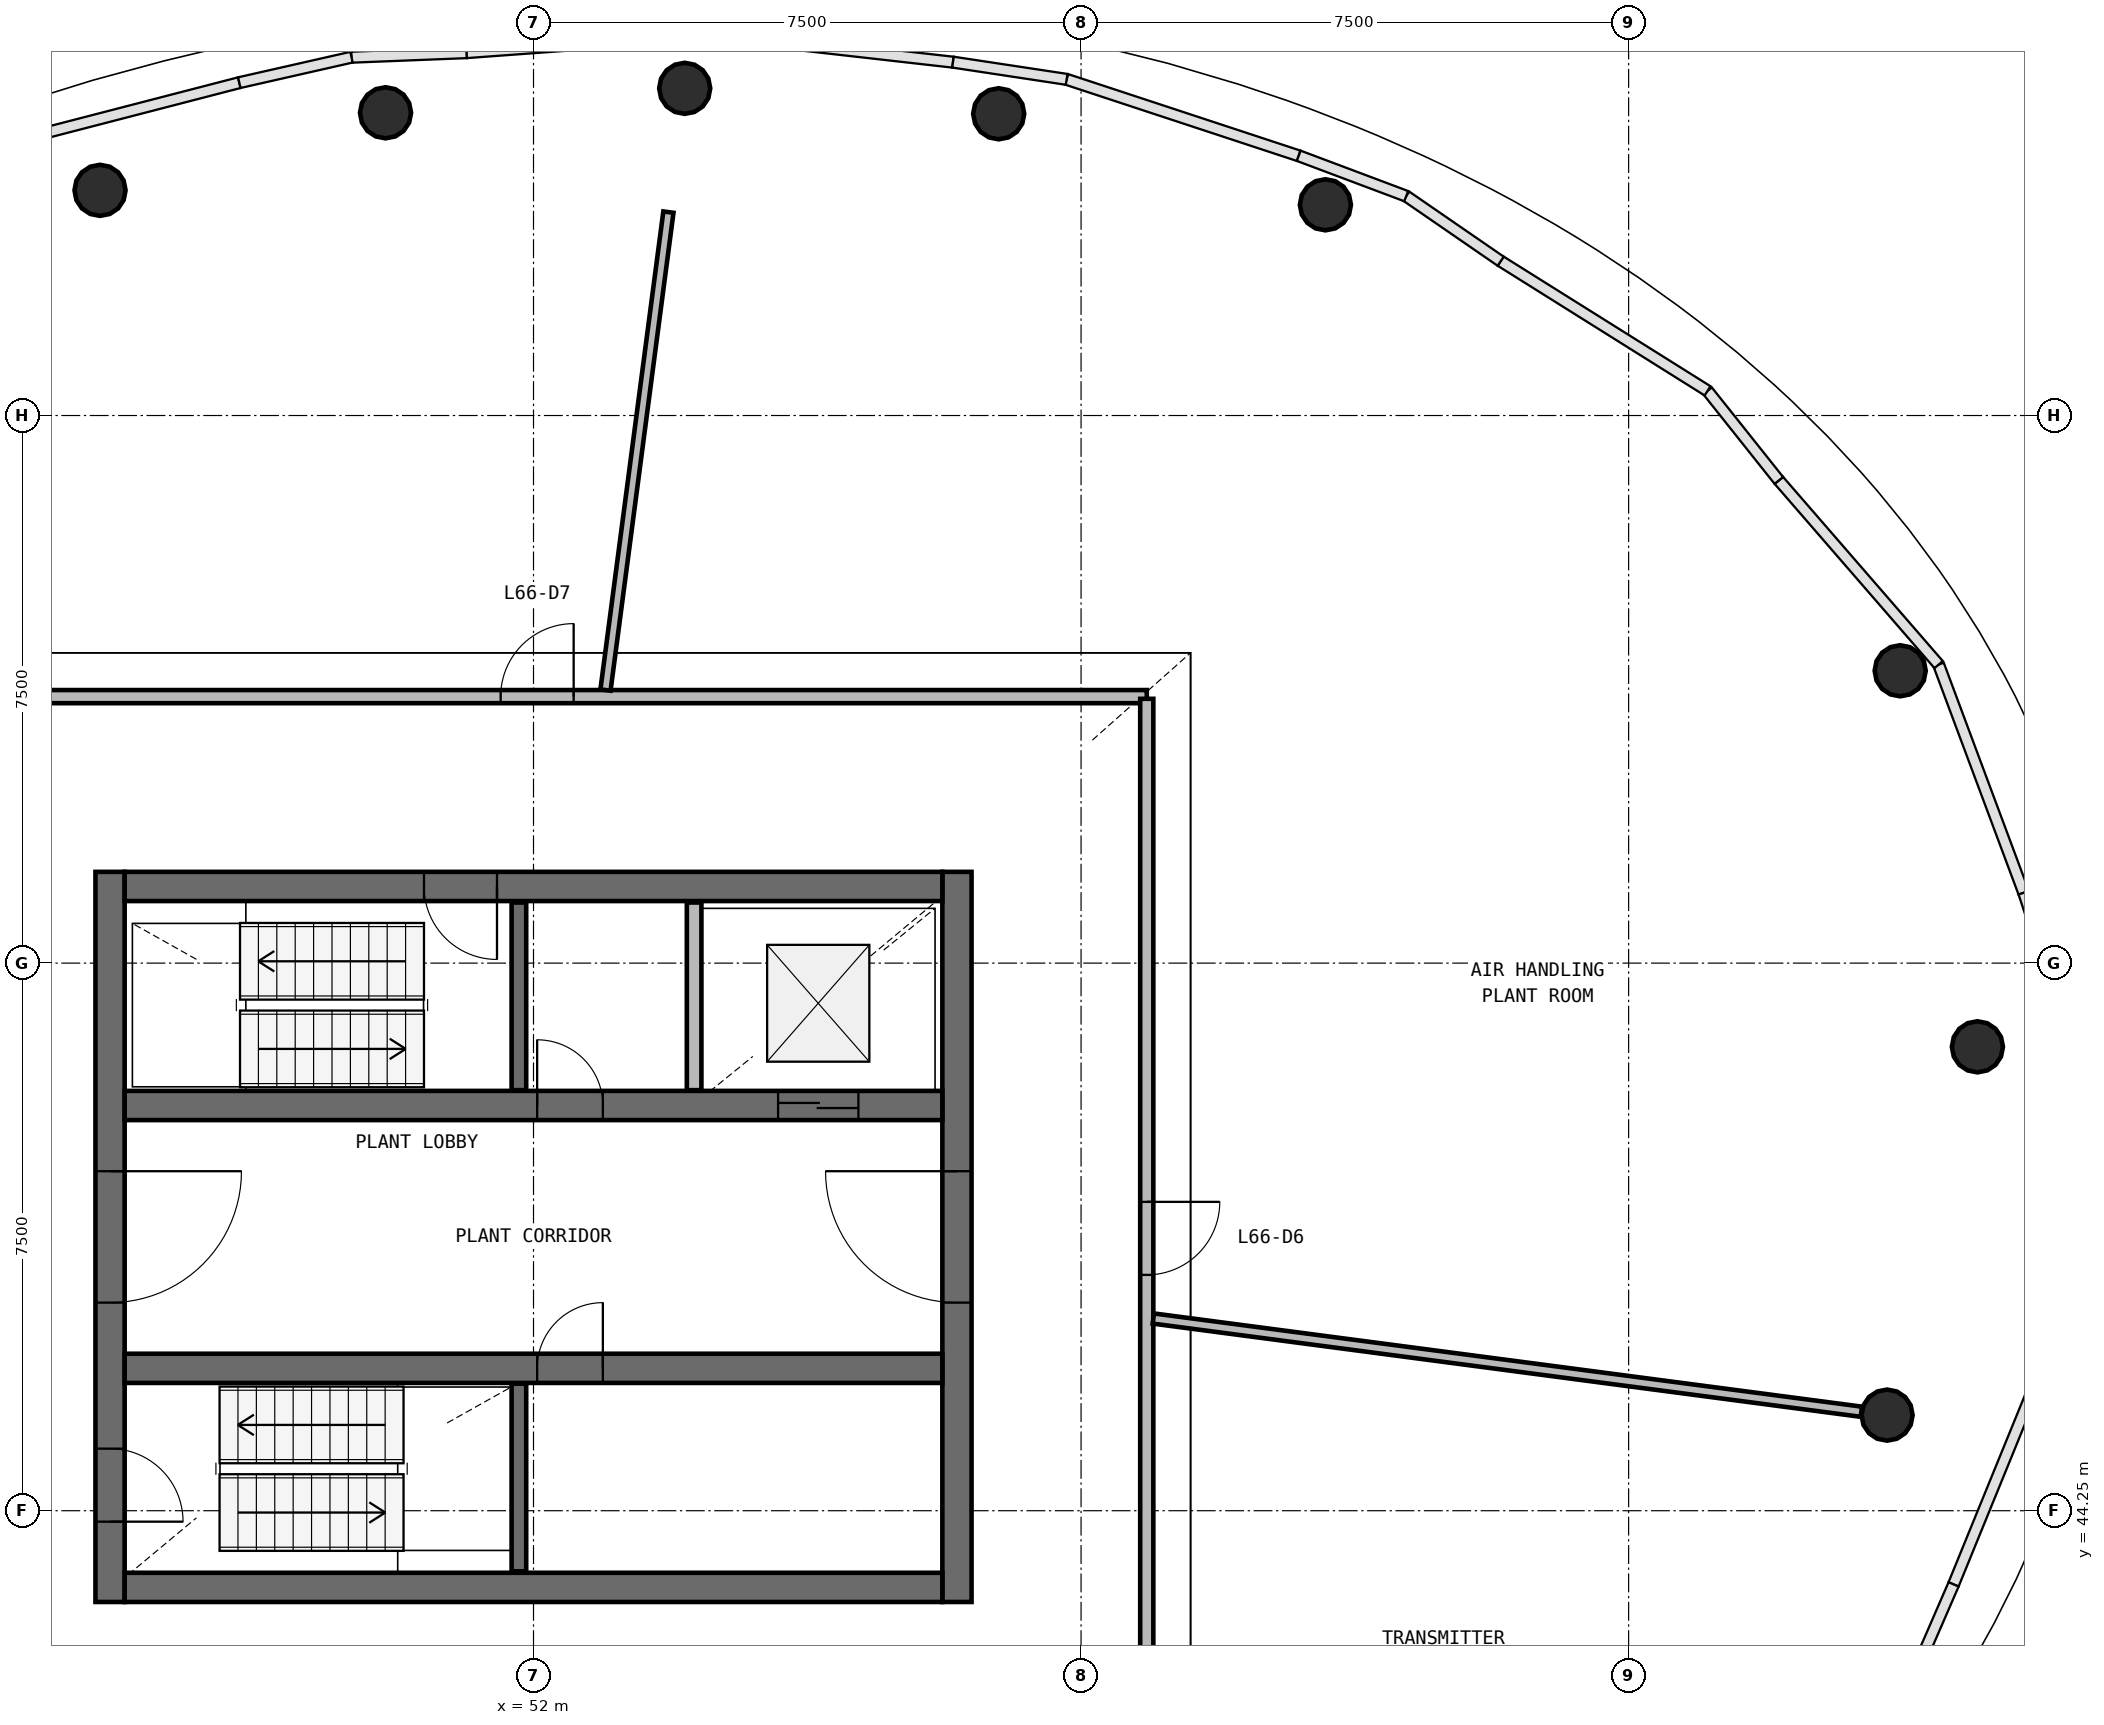
"""IFC4 building model, lengths in metres.
Left out: names, types, materials, properties, quantities, classifications, styles, units other than length and angle.
Written with IfcOpenShell. Run it as: python <this file> out.ifc"""

import sys

from ifc_helpers import new_model, si_unit, direction, frame, frame_2d, origin, origin_2d, place, context, subcontext, project, spatial, rectangle, circle, extrude, source, transform, mapped, element, fill, save


model = new_model("IFC4")
c1 = context("Model", 3, precision=1e-05, world=origin(), true_north=direction((0.0, 1.0)))
c2 = subcontext(c1, "Body", "Model", "MODEL_VIEW")
j1 = project(units=[si_unit("LENGTHUNIT", "METRE"), si_unit("PLANEANGLEUNIT", "RADIAN")], contexts=[c1])
p1 = place(None, origin())
s1 = spatial("IfcSite", under=j1, at=p1, CompositionType="ELEMENT")
p2 = place(p1, origin())
s2 = spatial("IfcBuilding", under=s1, at=p2, CompositionType="ELEMENT")
p3 = place(p2, frame((0.0, 0.0, 269.6)))
s3 = spatial("IfcBuildingStorey", under=s2, at=p3, CompositionType="ELEMENT", Elevation=269.6)
p4 = place(p3, frame((57.8, 43.0, 0.0), z_axis=(0.0, 0.0, 1.0), x_axis=(0.0, 1.0, 0.0)))
e1 = element("IfcWall", 1, at=p4, inside=s3, PredefinedType="SHEAR", context=c2, shape_type="SweptSolid", body=[
    extrude(rectangle(XDim=10.0, YDim=0.4, at=frame_2d((5.0, 0.0))), origin(), (0.0, 0.0, 1.0), 3.5),
])
p5 = place(p4, frame((4.1, 0.0, 0.0)))
e2 = element("IfcOpeningElement", 2, at=p5, cuts=e1, PredefinedType="OPENING", context=c2, shape_type="SweptSolid", body=[
    extrude(rectangle(XDim=1.8, YDim=2.1, at=frame_2d((0.9, 1.05))), frame((0.0, 0.21, 0.0), z_axis=(0.0, -1.0, 0.0), x_axis=(1.0, 0.0, 0.0)), (0.0, 0.0, 1.0), 0.42),
])
p6 = place(p3, frame((46.2, 53.0, 0.0), z_axis=(0.0, 0.0, 1.0), x_axis=(0.0, -1.0, 0.0)))
e3 = element("IfcWall", 3, at=p6, inside=s3, PredefinedType="SHEAR", context=c2, shape_type="SweptSolid", body=[
    extrude(rectangle(XDim=10.0, YDim=0.4, at=frame_2d((5.0, 0.0))), origin(), (0.0, 0.0, 1.0), 3.5),
])
p7 = place(p6, frame((4.1, 0.0, 0.0)))
e4 = element("IfcOpeningElement", 4, at=p7, cuts=e3, PredefinedType="OPENING", context=c2, shape_type="SweptSolid", body=[
    extrude(rectangle(XDim=1.8, YDim=2.1, at=frame_2d((0.9, 1.05))), frame((0.0, 0.21, 0.0), z_axis=(0.0, -1.0, 0.0), x_axis=(1.0, 0.0, 0.0)), (0.0, 0.0, 1.0), 0.42),
])
p8 = place(p6, frame((7.9, 0.0, 0.0)))
e5 = element("IfcOpeningElement", 5, at=p8, cuts=e3, PredefinedType="OPENING", context=c2, shape_type="SweptSolid", body=[
    extrude(rectangle(XDim=1.0, YDim=2.1, at=frame_2d((0.5, 1.05))), frame((0.0, 0.21, 0.0), z_axis=(0.0, -1.0, 0.0), x_axis=(1.0, 0.0, 0.0)), (0.0, 0.0, 1.0), 0.42),
])
p9 = place(p3, frame((46.4, 43.2, 0.0), z_axis=(0.0, 0.0, 1.0), x_axis=(1.0, 0.0, 0.0)))
e6 = element("IfcWall", 6, at=p9, inside=s3, PredefinedType="SHEAR", context=c2, shape_type="SweptSolid", body=[
    extrude(rectangle(XDim=11.2, YDim=0.4, at=frame_2d((5.6, 0.0))), origin(), (0.0, 0.0, 1.0), 3.5),
])
p10 = place(p3, frame((57.6, 52.8, 0.0), z_axis=(0.0, 0.0, 1.0), x_axis=(-1.0, 0.0, 0.0)))
e7 = element("IfcWall", 7, at=p10, inside=s3, PredefinedType="SHEAR", context=c2, shape_type="SweptSolid", body=[
    extrude(rectangle(XDim=11.2, YDim=0.4, at=frame_2d((5.6, 0.0))), origin(), (0.0, 0.0, 1.0), 3.5),
])
p11 = place(p10, frame((6.1, 0.0, 0.0)))
e8 = element("IfcOpeningElement", 8, at=p11, cuts=e7, PredefinedType="OPENING", context=c2, shape_type="SweptSolid", body=[
    extrude(rectangle(XDim=1.0, YDim=2.1, at=frame_2d((0.5, 1.05))), frame((0.0, 0.21, 0.0), z_axis=(0.0, -1.0, 0.0), x_axis=(1.0, 0.0, 0.0)), (0.0, 0.0, 1.0), 0.42),
])
p12 = place(p3, frame((46.4, 49.8, 0.0), z_axis=(0.0, 0.0, 1.0), x_axis=(1.0, 0.0, 0.0)))
e9 = element("IfcWall", 9, at=p12, inside=s3, PredefinedType="SHEAR", context=c2, shape_type="SweptSolid", body=[
    extrude(rectangle(XDim=11.2, YDim=0.4, at=frame_2d((5.6, 0.0))), origin(), (0.0, 0.0, 1.0), 3.5),
])
p13 = place(p12, frame((8.95, 0.0, 0.0)))
e10 = element("IfcOpeningElement", 10, at=p13, cuts=e9, PredefinedType="OPENING", context=c2, shape_type="SweptSolid", body=[
    extrude(rectangle(XDim=1.1, YDim=2.1, at=frame_2d((0.55, 1.05))), frame((0.0, 0.21, 0.0), z_axis=(0.0, -1.0, 0.0), x_axis=(1.0, 0.0, 0.0)), (0.0, 0.0, 1.0), 0.42),
])
p14 = place(p12, frame((5.65, 0.0, 0.0)))
e11 = element("IfcOpeningElement", 11, at=p14, cuts=e9, PredefinedType="OPENING", context=c2, shape_type="SweptSolid", body=[
    extrude(rectangle(XDim=0.9, YDim=2.1, at=frame_2d((0.45, 1.05))), frame((0.0, 0.21, 0.0), z_axis=(0.0, -1.0, 0.0), x_axis=(1.0, 0.0, 0.0)), (0.0, 0.0, 1.0), 0.42),
])
p15 = place(p3, frame((46.4, 46.2, 0.0), z_axis=(0.0, 0.0, 1.0), x_axis=(1.0, 0.0, 0.0)))
e12 = element("IfcWall", 12, at=p15, inside=s3, PredefinedType="SHEAR", context=c2, shape_type="SweptSolid", body=[
    extrude(rectangle(XDim=11.2, YDim=0.4, at=frame_2d((5.6, 0.0))), origin(), (0.0, 0.0, 1.0), 3.5),
])
p16 = place(p15, frame((5.65, 0.0, 0.0)))
e13 = element("IfcOpeningElement", 13, at=p16, cuts=e12, PredefinedType="OPENING", context=c2, shape_type="SweptSolid", body=[
    extrude(rectangle(XDim=0.9, YDim=2.1, at=frame_2d((0.45, 1.05))), frame((0.0, 0.21, 0.0), z_axis=(0.0, -1.0, 0.0), x_axis=(1.0, 0.0, 0.0)), (0.0, 0.0, 1.0), 0.42),
])
m1 = source(origin(), c2, "Body", "SweptSolid", [
    extrude(circle(Radius=0.35, at=origin_2d()), origin(), (0.0, 0.0, 1.0), 4.014),
])
p17 = place(p3, frame((71.777, 50.604, 0.174), z_axis=(-0.485558404991, -0.063918071599, 0.871864390525), x_axis=(0.130512333023, -0.991446685873, 0.0)))
e14 = element("IfcColumn", 14, at=p17, inside=s3, PredefinedType="COLUMN", context=c2, shape_type="MappedRepresentation", body=[
    mapped(m1, transform((0.0, 0.0, 0.0), scale=1.0)),
])
m2 = source(origin(), c2, "Body", "SweptSolid", [
    extrude(circle(Radius=0.35, at=origin_2d()), origin(), (0.0, 0.0, 1.0), 4.069),
])
p18 = place(p3, frame((70.719, 55.754, 0.181), z_axis=(-0.471318965741, -0.195223003376, 0.860085118745), x_axis=(0.382677234313, -0.923882099804, 0.0)))
e15 = element("IfcColumn", 15, at=p18, inside=s3, PredefinedType="COLUMN", context=c2, shape_type="MappedRepresentation", body=[
    mapped(m2, transform((0.0, 0.0, 0.0), scale=1.0)),
])
m3 = source(origin(), c2, "Body", "SweptSolid", [
    extrude(circle(Radius=0.35, at=origin_2d()), origin(), (0.0, 0.0, 1.0), 3.908),
])
p19 = place(p3, frame((62.847, 62.136, 0.159), z_axis=(-0.270812901307, -0.352962604933, 0.895587947666), x_axis=(0.793380296063, -0.608726297953, 0.0)))
e16 = element("IfcColumn", 16, at=p19, inside=s3, PredefinedType="COLUMN", context=c2, shape_type="MappedRepresentation", body=[
    mapped(m3, transform((0.0, 0.0, 0.0), scale=1.0)),
])
m4 = source(origin(), c2, "Body", "SweptSolid", [
    extrude(circle(Radius=0.35, at=origin_2d()), origin(), (0.0, 0.0, 1.0), 3.833),
])
p20 = place(p3, frame((58.372, 63.383, 0.146), z_axis=(-0.156091582457, -0.376950663633, 0.912986097963), x_axis=(0.923919818464, -0.382586158989, 0.0)))
e17 = element("IfcColumn", 17, at=p20, inside=s3, PredefinedType="COLUMN", context=c2, shape_type="MappedRepresentation", body=[
    mapped(m4, transform((0.0, 0.0, 0.0), scale=1.0)),
])
m5 = source(origin(), c2, "Body", "SweptSolid", [
    extrude(circle(Radius=0.35, at=origin_2d()), origin(), (0.0, 0.0, 1.0), 3.784),
])
p21 = place(p3, frame((54.071, 63.731, 0.136), z_axis=(-0.049610189762, -0.377076149752, 0.924852640349), x_axis=(0.991456027497, -0.130441349041, 0.0)))
e18 = element("IfcColumn", 18, at=p21, inside=s3, PredefinedType="COLUMN", context=c2, shape_type="MappedRepresentation", body=[
    mapped(m5, transform((0.0, 0.0, 0.0), scale=1.0)),
])
m6 = source(origin(), c2, "Body", "SweptSolid", [
    extrude(circle(Radius=0.35, at=origin_2d()), origin(), (0.0, 0.0, 1.0), 3.759),
])
p22 = place(p3, frame((49.973, 63.396, 0.131), z_axis=(0.047605122797, -0.361746976777, 0.93106008242), x_axis=(0.991451871974, 0.130472930369, 0.0)))
e19 = element("IfcColumn", 19, at=p22, inside=s3, PredefinedType="COLUMN", context=c2, shape_type="MappedRepresentation", body=[
    mapped(m6, transform((0.0, 0.0, 0.0), scale=1.0)),
])
m7 = source(origin(), c2, "Body", "SweptSolid", [
    extrude(circle(Radius=0.35, at=origin_2d()), origin(), (0.0, 0.0, 1.0), 3.747),
])
p23 = place(p3, frame((46.063, 62.334, 0.128), z_axis=(0.136574670104, -0.329773094178, 0.934129041323), x_axis=(0.923901142315, 0.382631257517, 0.0)))
e20 = element("IfcColumn", 20, at=p23, inside=s3, PredefinedType="COLUMN", context=c2, shape_type="MappedRepresentation", body=[
    mapped(m7, transform((0.0, 0.0, 0.0), scale=1.0)),
])
m8 = source(origin(), c2, "Body", "SweptSolid", [
    extrude(circle(Radius=0.35, at=origin_2d()), origin(), (0.0, 0.0, 1.0), 3.898),
])
p24 = place(p3, frame((70.54, 45.559, 0.157), z_axis=(-0.436576513493, 0.057492072785, 0.897828273911), x_axis=(-0.13056120367, -0.9914402514, 0.0)))
e21 = element("IfcColumn", 21, at=p24, inside=s3, PredefinedType="COLUMN", context=c2, shape_type="MappedRepresentation", body=[
    mapped(m8, transform((0.0, 0.0, 0.0), scale=1.0)),
])
for number, where, z_axis, x_axis in (
    (22, (51.8, 43.42, 0.0), (0.0, 0.0, 1.0), (0.0, 1.0, 0.0)),
    (23, (51.8, 50.01, 0.0), (0.0, 0.0, 1.0), (0.0, 1.0, 0.0)),
    (24, (54.2, 52.58, 0.0), (0.0, 0.0, 1.0), (0.0, -1.0, 0.0)),
):
    element("IfcWall", number, at=place(p3, frame(where, z_axis=z_axis, x_axis=x_axis)), inside=s3, PredefinedType="SOLIDWALL", context=c2, shape_type="SweptSolid", body=[
        extrude(rectangle(XDim=2.57, YDim=0.2, at=frame_2d((1.285, 0.0))), origin(), (0.0, 0.0, 1.0), 3.22),
    ])
p25 = place(p3, frame((43.6, 55.4, 0.0), z_axis=(0.0, 0.0, 1.0), x_axis=(1.0, 0.0, 0.0)))
e25 = element("IfcWall", 25, at=p25, inside=s3, PredefinedType="PARTITIONING", context=c2, shape_type="SweptSolid", body=[
    extrude(rectangle(XDim=16.8, YDim=0.18, at=frame_2d((8.4, 0.0))), origin(), (0.0, 0.0, 1.0), 2.62),
])
p26 = place(p25, frame((7.95, 0.0, 0.0)))
e26 = element("IfcOpeningElement", 26, at=p26, cuts=e25, PredefinedType="OPENING", context=c2, shape_type="SweptSolid", body=[
    extrude(rectangle(XDim=1.0, YDim=2.1, at=frame_2d((0.5, 1.05))), frame((0.0, 0.1, 0.0), z_axis=(0.0, -1.0, 0.0), x_axis=(1.0, 0.0, 0.0)), (0.0, 0.0, 1.0), 0.2),
])
p27 = place(p3, frame((60.4, 55.37, 0.0), z_axis=(0.0, 0.0, 1.0), x_axis=(0.0, -1.0, 0.0)))
e27 = element("IfcWall", 27, at=p27, inside=s3, PredefinedType="PARTITIONING", context=c2, shape_type="SweptSolid", body=[
    extrude(rectangle(XDim=14.74, YDim=0.18, at=frame_2d((7.37, 0.0))), origin(), (0.0, 0.0, 1.0), 2.62),
])
p28 = place(p27, frame((6.89, 0.0, 0.0)))
e28 = element("IfcOpeningElement", 28, at=p28, cuts=e27, PredefinedType="OPENING", context=c2, shape_type="SweptSolid", body=[
    extrude(rectangle(XDim=1.0, YDim=2.1, at=frame_2d((0.5, 1.05))), frame((0.0, 0.1, 0.0), z_axis=(0.0, -1.0, 0.0), x_axis=(1.0, 0.0, 0.0)), (0.0, 0.0, 1.0), 0.2),
])
p29 = place(p3, frame((60.49, 46.882, 0.0), z_axis=(0.0, 0.0, 1.0), x_axis=(0.991444523753, -0.130528756683, 0.0)))
e29 = element("IfcWall", 29, at=p29, inside=s3, PredefinedType="PARTITIONING", context=c2, shape_type="SweptSolid", body=[
    extrude(rectangle(XDim=9.782, YDim=0.14, at=frame_2d((4.891, 0.0))), origin(), (0.0, 0.0, 1.0), 2.62),
])
p30 = place(p3, frame((52.986, 55.49, 0.0), z_axis=(0.0, 0.0, 1.0), x_axis=(0.130531034985, 0.9914442238, 0.0)))
e30 = element("IfcWall", 30, at=p30, inside=s3, PredefinedType="PARTITIONING", context=c2, shape_type="SweptSolid", body=[
    extrude(rectangle(XDim=6.602, YDim=0.14, at=frame_2d((3.301, 0.0))), origin(), (0.0, 0.0, 1.0), 2.62),
])
m9 = source(origin(), c2, "Body", "SweptSolid", [
    extrude(rectangle(XDim=1.8, YDim=2.1, at=frame_2d((0.9, 1.05))), frame((0.0, 0.025, 0.0), z_axis=(0.0, -1.0, 0.0), x_axis=(1.0, 0.0, 0.0)), (0.0, 0.0, 1.0), 0.05),
])
p31 = place(p7, origin())
e31 = element("IfcDoor", 31, at=p31, inside=s3, OperationType="SINGLE_SWING_LEFT", PredefinedType="DOOR", context=c2, shape_type="MappedRepresentation", body=[
    mapped(m9, transform((0.0, 0.0, 0.0), scale=1.0)),
])
fill(e4, e31)
p32 = place(p5, origin())
e32 = element("IfcDoor", 32, at=p32, inside=s3, OperationType="SINGLE_SWING_RIGHT", PredefinedType="DOOR", context=c2, shape_type="MappedRepresentation", body=[
    mapped(m9, transform((0.0, 0.0, 0.0), scale=1.0)),
])
fill(e2, e32)
m10 = source(origin(), c2, "Body", "SweptSolid", [
    extrude(rectangle(XDim=1.0, YDim=2.1, at=frame_2d((0.5, 1.05))), frame((0.0, 0.025, 0.0), z_axis=(0.0, -1.0, 0.0), x_axis=(1.0, 0.0, 0.0)), (0.0, 0.0, 1.0), 0.05),
])
p33 = place(p11, origin())
e33 = element("IfcDoor", 33, at=p33, inside=s3, OperationType="SINGLE_SWING_LEFT", PredefinedType="DOOR", context=c2, shape_type="MappedRepresentation", body=[
    mapped(m10, transform((0.0, 0.0, 0.0), scale=1.0)),
])
fill(e8, e33)
p34 = place(p8, origin())
e34 = element("IfcDoor", 34, at=p34, inside=s3, OperationType="SINGLE_SWING_RIGHT", PredefinedType="DOOR", context=c2, shape_type="MappedRepresentation", body=[
    mapped(m10, transform((0.0, 0.0, 0.0), scale=1.0)),
])
fill(e5, e34)
m11 = source(origin(), c2, "Body", "SweptSolid", [
    extrude(rectangle(XDim=1.1, YDim=2.1, at=frame_2d((0.55, 1.05))), frame((0.0, 0.025, 0.0), z_axis=(0.0, -1.0, 0.0), x_axis=(1.0, 0.0, 0.0)), (0.0, 0.0, 1.0), 0.05),
])
p35 = place(p13, origin())
e35 = element("IfcDoor", 35, at=p35, inside=s3, OperationType="DOUBLE_DOOR_SLIDING", PredefinedType="USERDEFINED", context=c2, shape_type="MappedRepresentation", body=[
    mapped(m11, transform((0.0, 0.0, 0.0), scale=1.0)),
])
fill(e10, e35)
m12 = source(origin(), c2, "Body", "SweptSolid", [
    extrude(rectangle(XDim=1.0, YDim=2.1, at=frame_2d((0.5, 1.05))), frame((0.0, 0.025, 0.0), z_axis=(0.0, -1.0, 0.0), x_axis=(1.0, 0.0, 0.0)), (0.0, 0.0, 1.0), 0.05),
])
p36 = place(p28, origin())
e36 = element("IfcDoor", 36, at=p36, inside=s3, OperationType="SINGLE_SWING_LEFT", PredefinedType="DOOR", context=c2, shape_type="MappedRepresentation", body=[
    mapped(m12, transform((0.0, 0.0, 0.0), scale=1.0)),
])
fill(e28, e36)
p37 = place(p26, origin())
e37 = element("IfcDoor", 37, at=p37, inside=s3, OperationType="SINGLE_SWING_RIGHT", PredefinedType="DOOR", context=c2, shape_type="MappedRepresentation", body=[
    mapped(m12, transform((0.0, 0.0, 0.0), scale=1.0)),
])
fill(e26, e37)
m13 = source(origin(), c2, "Body", "SweptSolid", [
    extrude(rectangle(XDim=0.9, YDim=2.1, at=frame_2d((0.45, 1.05))), frame((0.0, 0.025, 0.0), z_axis=(0.0, -1.0, 0.0), x_axis=(1.0, 0.0, 0.0)), (0.0, 0.0, 1.0), 0.05),
])
p38 = place(p14, origin())
e38 = element("IfcDoor", 38, at=p38, inside=s3, OperationType="SINGLE_SWING_LEFT", PredefinedType="DOOR", context=c2, shape_type="MappedRepresentation", body=[
    mapped(m13, transform((0.0, 0.0, 0.0), scale=1.0)),
])
fill(e11, e38)
p39 = place(p16, origin())
e39 = element("IfcDoor", 39, at=p39, inside=s3, OperationType="SINGLE_SWING_RIGHT", PredefinedType="DOOR", context=c2, shape_type="MappedRepresentation", body=[
    mapped(m13, transform((0.0, 0.0, 0.0), scale=1.0)),
])
fill(e13, e39)
save(model, sys.argv[1])
